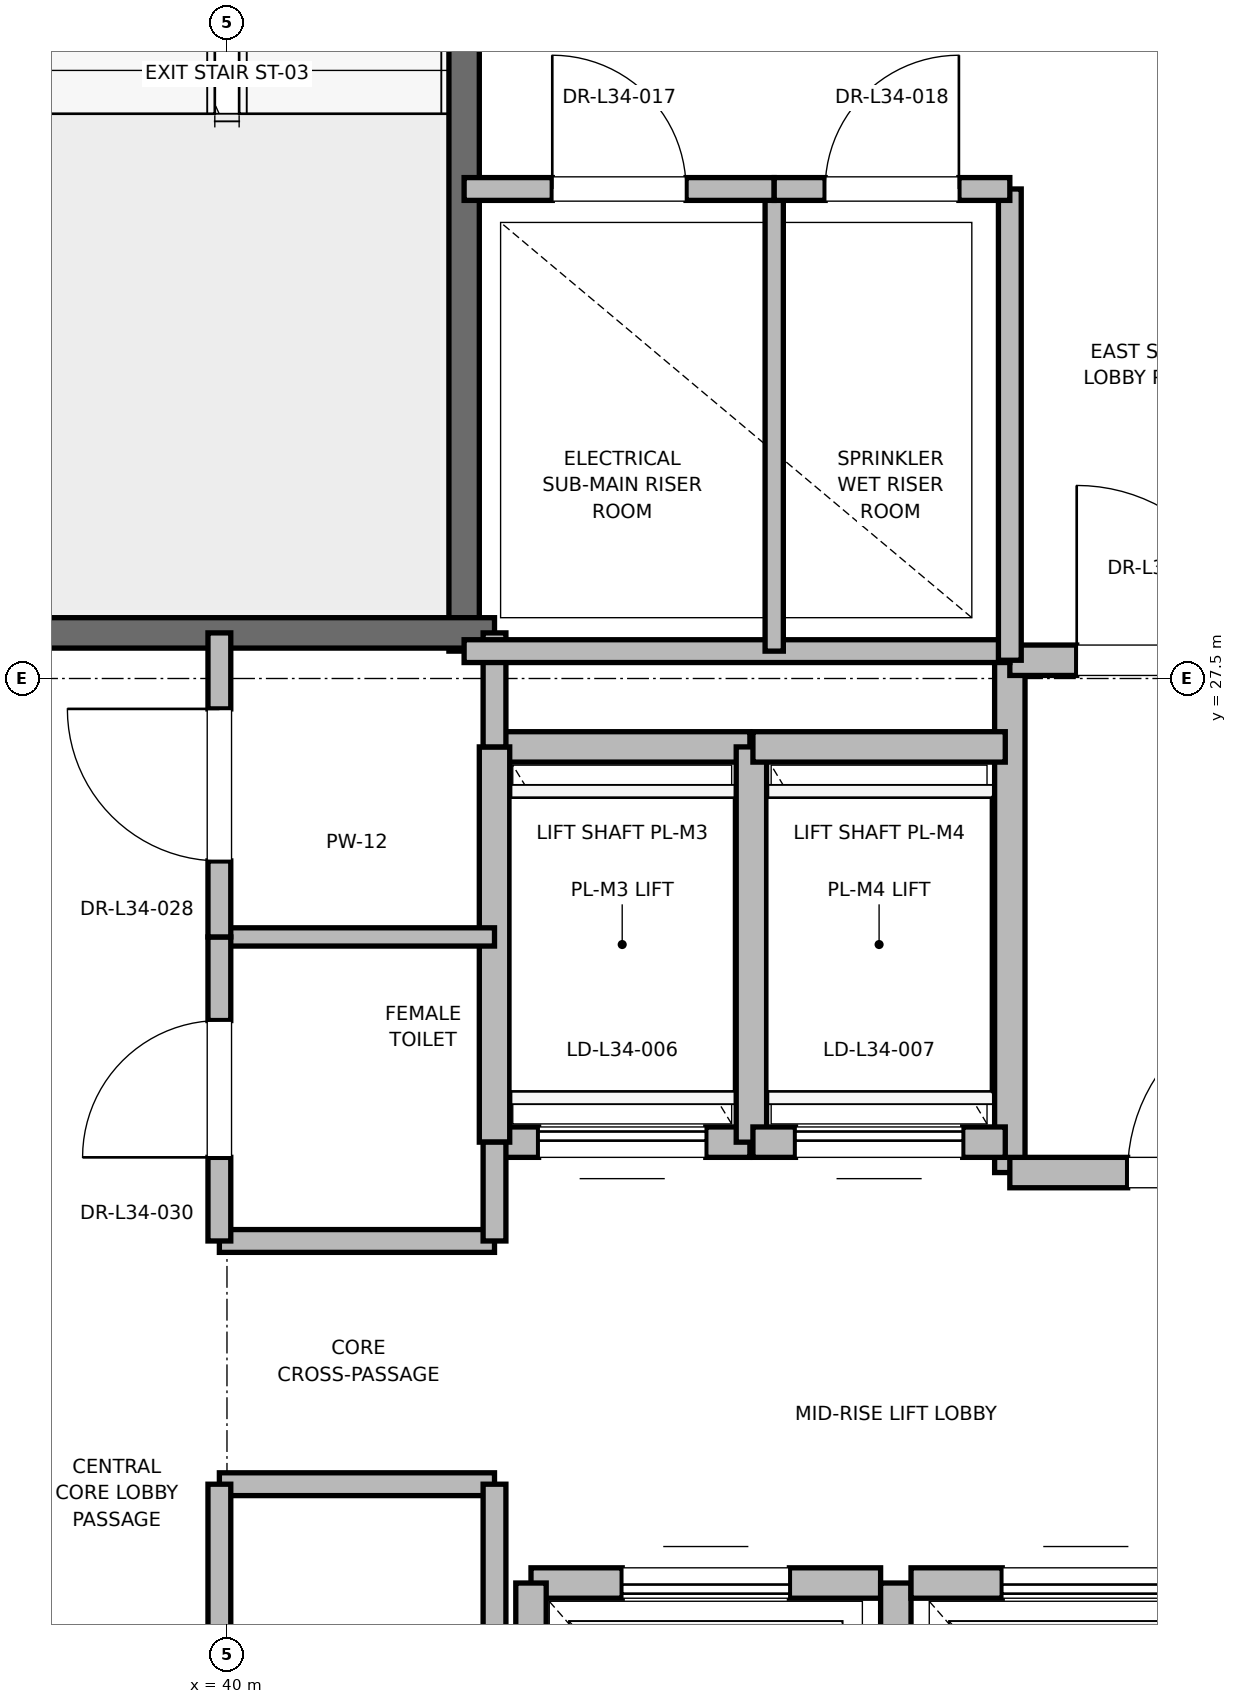
"""IFC4 building model, lengths in metres.
Left out: names, types, materials, properties, quantities, classifications, styles, units other than length and angle.
Written with IfcOpenShell. Run it as: python <this file> out.ifc"""

import sys

from ifc_helpers import new_model, si_unit, direction, frame, frame_2d, origin, place, context, subcontext, project, spatial, rectangle, extrude, element, fill, save


model = new_model("IFC4")
c1 = context("Model", 3, precision=1e-05, world=origin(), true_north=direction((0.0, 1.0)))
c2 = subcontext(c1, "Body", "Model", "MODEL_VIEW")
j1 = project(units=[si_unit("LENGTHUNIT", "METRE"), si_unit("PLANEANGLEUNIT", "RADIAN")], contexts=[c1])
p1 = place(None, origin())
s1 = spatial("IfcSite", under=j1, at=p1, CompositionType="ELEMENT")
p2 = place(p1, origin())
s2 = spatial("IfcBuilding", under=s1, at=p2, CompositionType="ELEMENT")
p3 = place(p2, frame((0.0, 0.0, 148.4)))
s3 = spatial("IfcBuildingStorey", under=s2, at=p3, CompositionType="ELEMENT", Elevation=148.4)
p4 = place(p3, frame((41.56, 27.68, 0.0), z_axis=(0.0, 0.0, 1.0), x_axis=(0.0, 1.0, 0.0)))
e1 = element("IfcWall", 1, at=p4, inside=s3, PredefinedType="SOLIDWALL", context=c2, shape_type="SweptSolid", body=[
    extrude(rectangle(XDim=8.57, YDim=0.2, at=frame_2d((4.285, 0.0))), origin(), (0.0, 0.0, 1.0), 3.775),
])
p5 = place(p3, frame((38.44, 27.8, 0.0), z_axis=(0.0, 0.0, 1.0), x_axis=(1.0, 0.0, 0.0)))
e2 = element("IfcWall", 2, at=p5, inside=s3, PredefinedType="SOLIDWALL", context=c2, shape_type="SweptSolid", body=[
    extrude(rectangle(XDim=3.32, YDim=0.2, at=frame_2d((1.66, 0.0))), origin(), (0.0, 0.0, 1.0), 3.775),
])
p6 = place(p3, frame((45.15, 24.25, 0.0), z_axis=(0.0, 0.0, 1.0), x_axis=(0.0, 1.0, 0.0)))
e3 = element("IfcWall", 3, at=p6, inside=s3, PredefinedType="PARTITIONING", context=c2, shape_type="SweptSolid", body=[
    extrude(rectangle(XDim=3.37, YDim=0.2, at=frame_2d((1.685, 0.0))), origin(), (0.0, 0.0, 1.0), 3.775),
])
p7 = place(p3, frame((45.15, 24.25, 0.0), z_axis=(0.0, 0.0, 1.0), x_axis=(1.0, 0.0, 0.0)))
e4 = element("IfcWall", 4, at=p7, inside=s3, PredefinedType="PARTITIONING", context=c2, shape_type="SweptSolid", body=[
    extrude(rectangle(XDim=2.7, YDim=0.2, at=frame_2d((1.35, 0.0))), origin(), (0.0, 0.0, 1.0), 3.775),
])
p8 = place(p7, frame((0.775, 0.0, 0.0)))
e5 = element("IfcOpeningElement", 5, at=p8, cuts=e4, PredefinedType="OPENING", context=c2, shape_type="SweptSolid", body=[
    extrude(rectangle(XDim=1.15, YDim=2.2, at=frame_2d((0.575, 1.1))), frame((0.0, 0.1, 0.0), z_axis=(0.0, -1.0, 0.0), x_axis=(1.0, 0.0, 0.0)), (0.0, 0.0, 1.0), 0.2),
])
p9 = place(p3, frame((45.15, 27.62, 0.0), z_axis=(0.0, 0.0, 1.0), x_axis=(1.0, 0.0, 0.0)))
e6 = element("IfcWall", 6, at=p9, inside=s3, PredefinedType="PARTITIONING", context=c2, shape_type="SweptSolid", body=[
    extrude(rectangle(XDim=2.03, YDim=0.2, at=frame_2d((1.015, 0.0))), origin(), (0.0, 0.0, 1.0), 3.775),
])
p10 = place(p9, frame((0.44, 0.0, 0.0)))
e7 = element("IfcOpeningElement", 7, at=p10, cuts=e6, PredefinedType="OPENING", context=c2, shape_type="SweptSolid", body=[
    extrude(rectangle(XDim=1.15, YDim=2.2, at=frame_2d((0.575, 1.1))), frame((0.0, 0.1, 0.0), z_axis=(0.0, -1.0, 0.0), x_axis=(1.0, 0.0, 0.0)), (0.0, 0.0, 1.0), 0.2),
])
p11 = place(p3, frame((44.3, 21.55, 0.0), z_axis=(0.0, 0.0, 1.0), x_axis=(-1.0, 0.0, 0.0)))
e8 = element("IfcWall", 8, at=p11, inside=s3, PredefinedType="SOLIDWALL", context=c2, shape_type="SweptSolid", body=[
    extrude(rectangle(XDim=2.3, YDim=0.2, at=frame_2d((1.15, 0.0))), origin(), (0.0, 0.0, 1.0), 3.775),
])
p12 = place(p11, frame((0.6, 0.0, 0.0)))
e9 = element("IfcOpeningElement", 9, at=p12, cuts=e8, PredefinedType="OPENING", context=c2, shape_type="SweptSolid", body=[
    extrude(rectangle(XDim=1.1, YDim=2.2, at=frame_2d((0.55, 1.1))), frame((0.0, 0.1, 0.0), z_axis=(0.0, -1.0, 0.0), x_axis=(1.0, 0.0, 0.0)), (0.0, 0.0, 1.0), 0.2),
])
p13 = place(p3, frame((42.0, 21.55, 0.0), z_axis=(0.0, 0.0, 1.0), x_axis=(0.0, -1.0, 0.0)))
e10 = element("IfcWall", 10, at=p13, inside=s3, PredefinedType="SOLIDWALL", context=c2, shape_type="SweptSolid", body=[
    extrude(rectangle(XDim=2.6, YDim=0.2, at=frame_2d((1.3, 0.0))), origin(), (0.0, 0.0, 1.0), 2.755),
])
p14 = place(p3, frame((44.4, 18.95, 0.0), z_axis=(0.0, 0.0, 1.0), x_axis=(0.0, 1.0, 0.0)))
e11 = element("IfcWall", 11, at=p14, inside=s3, PredefinedType="SOLIDWALL", context=c2, shape_type="SweptSolid", body=[
    extrude(rectangle(XDim=2.6, YDim=0.2, at=frame_2d((1.3, 0.0))), origin(), (0.0, 0.0, 1.0), 3.775),
])
p15 = place(p3, frame((46.8, 21.55, 0.0), z_axis=(0.0, 0.0, 1.0), x_axis=(-1.0, 0.0, 0.0)))
e12 = element("IfcWall", 12, at=p15, inside=s3, PredefinedType="SOLIDWALL", context=c2, shape_type="SweptSolid", body=[
    extrude(rectangle(XDim=2.3, YDim=0.2, at=frame_2d((1.15, 0.0))), origin(), (0.0, 0.0, 1.0), 3.775),
])
p16 = place(p15, frame((0.6, 0.0, 0.0)))
e13 = element("IfcOpeningElement", 13, at=p16, cuts=e12, PredefinedType="OPENING", context=c2, shape_type="SweptSolid", body=[
    extrude(rectangle(XDim=1.1, YDim=2.2, at=frame_2d((0.55, 1.1))), frame((0.0, 0.1, 0.0), z_axis=(0.0, -1.0, 0.0), x_axis=(1.0, 0.0, 0.0)), (0.0, 0.0, 1.0), 0.2),
])
p17 = place(p3, frame((41.76, 24.45, 0.0), z_axis=(0.0, 0.0, 1.0), x_axis=(1.0, 0.0, 0.0)))
e14 = element("IfcWall", 14, at=p17, inside=s3, PredefinedType="SOLIDWALL", context=c2, shape_type="SweptSolid", body=[
    extrude(rectangle(XDim=1.68, YDim=0.2, at=frame_2d((0.84, 0.0))), origin(), (0.0, 0.0, 1.0), 3.775),
])
p18 = place(p17, frame((0.29, 0.0, 0.0)))
e15 = element("IfcOpeningElement", 15, at=p18, cuts=e14, PredefinedType="OPENING", context=c2, shape_type="SweptSolid", body=[
    extrude(rectangle(XDim=1.1, YDim=2.2, at=frame_2d((0.55, 1.1))), frame((0.0, 0.1, 0.0), z_axis=(0.0, -1.0, 0.0), x_axis=(1.0, 0.0, 0.0)), (0.0, 0.0, 1.0), 0.2),
])
p19 = place(p3, frame((43.44, 27.05, 0.0), z_axis=(0.0, 0.0, 1.0), x_axis=(-1.0, 0.0, 0.0)))
e16 = element("IfcWall", 16, at=p19, inside=s3, PredefinedType="SOLIDWALL", context=c2, shape_type="SweptSolid", body=[
    extrude(rectangle(XDim=1.68, YDim=0.2, at=frame_2d((0.84, 0.0))), origin(), (0.0, 0.0, 1.0), 3.775),
])
for number, where, z_axis, x_axis in (
    (17, (41.76, 27.05, 0.0), (0.0, 0.0, 1.0), (0.0, -1.0, 0.0)),
    (18, (43.45, 24.45, 0.0), (0.0, 0.0, 1.0), (0.0, 1.0, 0.0)),
):
    element("IfcWall", number, at=place(p3, frame(where, z_axis=z_axis, x_axis=x_axis)), inside=s3, PredefinedType="SOLIDWALL", context=c2, shape_type="SweptSolid", body=[
        extrude(rectangle(XDim=2.6, YDim=0.2, at=frame_2d((1.3, 0.0))), origin(), (0.0, 0.0, 1.0), 3.775),
    ])
p20 = place(p3, frame((43.46, 24.45, 0.0), z_axis=(0.0, 0.0, 1.0), x_axis=(1.0, 0.0, 0.0)))
e19 = element("IfcWall", 19, at=p20, inside=s3, PredefinedType="SOLIDWALL", context=c2, shape_type="SweptSolid", body=[
    extrude(rectangle(XDim=1.66, YDim=0.2, at=frame_2d((0.83, 0.0))), origin(), (0.0, 0.0, 1.0), 3.775),
])
p21 = place(p20, frame((0.28, 0.0, 0.0)))
e20 = element("IfcOpeningElement", 20, at=p21, cuts=e19, PredefinedType="OPENING", context=c2, shape_type="SweptSolid", body=[
    extrude(rectangle(XDim=1.1, YDim=2.2, at=frame_2d((0.55, 1.1))), frame((0.0, 0.1, 0.0), z_axis=(0.0, -1.0, 0.0), x_axis=(1.0, 0.0, 0.0)), (0.0, 0.0, 1.0), 0.2),
])
p22 = place(p3, frame((45.12, 27.05, 0.0), z_axis=(0.0, 0.0, 1.0), x_axis=(-1.0, 0.0, 0.0)))
e21 = element("IfcWall", 21, at=p22, inside=s3, PredefinedType="SOLIDWALL", context=c2, shape_type="SweptSolid", body=[
    extrude(rectangle(XDim=1.66, YDim=0.2, at=frame_2d((0.83, 0.0))), origin(), (0.0, 0.0, 1.0), 3.775),
])
for number, where, z_axis, x_axis in (
    (22, (39.95, 22.2, 0.0), (0.0, 0.0, 1.0), (1.0, 0.0, 0.0)),
    (23, (39.95, 23.8, 0.0), (0.0, 0.0, 1.0), (1.0, 0.0, 0.0)),
):
    element("IfcWall", number, at=place(p3, frame(where, z_axis=z_axis, x_axis=x_axis)), inside=s3, PredefinedType="PARTITIONING", context=c2, shape_type="SweptSolid", body=[
        extrude(rectangle(XDim=1.81, YDim=0.15, at=frame_2d((0.905, 0.0))), origin(), (0.0, 0.0, 1.0), 2.85),
    ])
p23 = place(p3, frame((39.95, 25.8, 0.0), z_axis=(0.0, 0.0, 1.0), x_axis=(1.0, 0.0, 0.0)))
e24 = element("IfcWall", 24, at=p23, inside=s3, PredefinedType="PARTITIONING", context=c2, shape_type="SweptSolid", body=[
    extrude(rectangle(XDim=1.81, YDim=0.12, at=frame_2d((0.905, 0.0))), origin(), (0.0, 0.0, 1.0), 2.85),
])
p24 = place(p3, frame((41.76, 18.6, 0.0), z_axis=(0.0, 0.0, 1.0), x_axis=(0.0, 1.0, 0.0)))
e25 = element("IfcWall", 25, at=p24, inside=s3, PredefinedType="PARTITIONING", context=c2, shape_type="SweptSolid", body=[
    extrude(rectangle(XDim=3.6, YDim=0.15, at=frame_2d((1.8, 0.0))), origin(), (0.0, 0.0, 1.0), 2.755),
])
p25 = place(p3, frame((41.76, 23.8, 0.0), z_axis=(0.0, 0.0, 1.0), x_axis=(0.0, 1.0, 0.0)))
e26 = element("IfcWall", 26, at=p25, inside=s3, PredefinedType="PARTITIONING", context=c2, shape_type="SweptSolid", body=[
    extrude(rectangle(XDim=0.65, YDim=0.15, at=frame_2d((0.325, 0.0))), origin(), (0.0, 0.0, 1.0), 2.85),
])
p26 = place(p3, frame((41.76, 27.05, 0.0), z_axis=(0.0, 0.0, 1.0), x_axis=(0.0, 1.0, 0.0)))
e27 = element("IfcWall", 27, at=p26, inside=s3, PredefinedType="PARTITIONING", context=c2, shape_type="SweptSolid", body=[
    extrude(rectangle(XDim=0.75, YDim=0.15, at=frame_2d((0.375, 0.0))), origin(), (0.0, 0.0, 1.0), 2.85),
])
p27 = place(p3, frame((39.95, 19.2, 0.0), z_axis=(0.0, 0.0, 1.0), x_axis=(0.0, 1.0, 0.0)))
e28 = element("IfcWall", 28, at=p27, inside=s3, PredefinedType="PARTITIONING", context=c2, shape_type="SweptSolid", body=[
    extrude(rectangle(XDim=3.0, YDim=0.15, at=frame_2d((1.5, 0.0))), origin(), (0.0, 0.0, 1.0), 2.85),
])
p28 = place(p27, frame((1.05, 0.0, 0.0)))
e29 = element("IfcOpeningElement", 29, at=p28, cuts=e28, PredefinedType="OPENING", context=c2, shape_type="SweptSolid", body=[
    extrude(rectangle(XDim=0.9, YDim=2.1, at=frame_2d((0.45, 1.05))), frame((0.0, 0.075, 0.0), z_axis=(0.0, -1.0, 0.0), x_axis=(1.0, 0.0, 0.0)), (0.0, 0.0, 1.0), 0.15),
])
p29 = place(p3, frame((39.95, 23.8, 0.0), z_axis=(0.0, 0.0, 1.0), x_axis=(0.0, 1.0, 0.0)))
e30 = element("IfcWall", 30, at=p29, inside=s3, PredefinedType="PARTITIONING", context=c2, shape_type="SweptSolid", body=[
    extrude(rectangle(XDim=2.0, YDim=0.15, at=frame_2d((1.0, 0.0))), origin(), (0.0, 0.0, 1.0), 2.85),
])
p30 = place(p29, frame((0.55, 0.0, 0.0)))
e31 = element("IfcOpeningElement", 31, at=p30, cuts=e30, PredefinedType="OPENING", context=c2, shape_type="SweptSolid", body=[
    extrude(rectangle(XDim=0.9, YDim=2.1, at=frame_2d((0.45, 1.05))), frame((0.0, 0.075, 0.0), z_axis=(0.0, -1.0, 0.0), x_axis=(1.0, 0.0, 0.0)), (0.0, 0.0, 1.0), 0.15),
])
p31 = place(p3, frame((39.95, 25.8, 0.0), z_axis=(0.0, 0.0, 1.0), x_axis=(0.0, 1.0, 0.0)))
e32 = element("IfcWall", 32, at=p31, inside=s3, PredefinedType="PARTITIONING", context=c2, shape_type="SweptSolid", body=[
    extrude(rectangle(XDim=2.0, YDim=0.15, at=frame_2d((1.0, 0.0))), origin(), (0.0, 0.0, 1.0), 2.85),
])
p32 = place(p31, frame((0.5, 0.0, 0.0)))
e33 = element("IfcOpeningElement", 33, at=p32, cuts=e32, PredefinedType="OPENING", context=c2, shape_type="SweptSolid", body=[
    extrude(rectangle(XDim=1.0, YDim=2.15, at=frame_2d((0.5, 1.075))), frame((0.0, 0.075, 0.0), z_axis=(0.0, -1.0, 0.0), x_axis=(1.0, 0.0, 0.0)), (0.0, 0.0, 1.0), 0.15),
])
p33 = place(p3, frame((41.56, 27.68, 0.0), z_axis=(0.0, 0.0, 1.0), x_axis=(1.0, 0.0, 0.0)))
e34 = element("IfcWall", 34, at=p33, inside=s3, PredefinedType="PARTITIONING", context=c2, shape_type="SweptSolid", body=[
    extrude(rectangle(XDim=3.59, YDim=0.15, at=frame_2d((1.795, 0.0))), origin(), (0.0, 0.0, 1.0), 2.85),
])
p34 = place(p3, frame((45.15, 27.62, 0.0), z_axis=(0.0, 0.0, 1.0), x_axis=(0.0, 1.0, 0.0)))
e35 = element("IfcWall", 35, at=p34, inside=s3, PredefinedType="PARTITIONING", context=c2, shape_type="SweptSolid", body=[
    extrude(rectangle(XDim=3.1, YDim=0.15, at=frame_2d((1.55, 0.0))), origin(), (0.0, 0.0, 1.0), 2.85),
])
p35 = place(p3, frame((43.6, 27.68, 0.0), z_axis=(0.0, 0.0, 1.0), x_axis=(0.0, 1.0, 0.0)))
e36 = element("IfcWall", 36, at=p35, inside=s3, PredefinedType="PARTITIONING", context=c2, shape_type="SweptSolid", body=[
    extrude(rectangle(XDim=3.04, YDim=0.12, at=frame_2d((1.52, 0.0))), origin(), (0.0, 0.0, 1.0), 2.85),
])
p36 = place(p3, frame((41.56, 30.72, 0.0), z_axis=(0.0, 0.0, 1.0), x_axis=(1.0, 0.0, 0.0)))
e37 = element("IfcWall", 37, at=p36, inside=s3, PredefinedType="PARTITIONING", context=c2, shape_type="SweptSolid", body=[
    extrude(rectangle(XDim=2.04, YDim=0.15, at=frame_2d((1.02, 0.0))), origin(), (0.0, 0.0, 1.0), 2.85),
])
p37 = place(p36, frame((0.58, 0.0, 0.0)))
e38 = element("IfcOpeningElement", 38, at=p37, cuts=e37, PredefinedType="OPENING", context=c2, shape_type="SweptSolid", body=[
    extrude(rectangle(XDim=0.88, YDim=2.1, at=frame_2d((0.44, 1.05))), frame((0.0, 0.075, 0.0), z_axis=(0.0, -1.0, 0.0), x_axis=(1.0, 0.0, 0.0)), (0.0, 0.0, 1.0), 0.15),
])
p38 = place(p3, frame((43.6, 30.72, 0.0), z_axis=(0.0, 0.0, 1.0), x_axis=(1.0, 0.0, 0.0)))
e39 = element("IfcWall", 39, at=p38, inside=s3, PredefinedType="PARTITIONING", context=c2, shape_type="SweptSolid", body=[
    extrude(rectangle(XDim=1.55, YDim=0.15, at=frame_2d((0.775, 0.0))), origin(), (0.0, 0.0, 1.0), 2.85),
])
p39 = place(p38, frame((0.335, 0.0, 0.0)))
e40 = element("IfcOpeningElement", 40, at=p39, cuts=e39, PredefinedType="OPENING", context=c2, shape_type="SweptSolid", body=[
    extrude(rectangle(XDim=0.88, YDim=2.1, at=frame_2d((0.44, 1.05))), frame((0.0, 0.075, 0.0), z_axis=(0.0, -1.0, 0.0), x_axis=(1.0, 0.0, 0.0)), (0.0, 0.0, 1.0), 0.15),
])
p40 = place(p8, origin())
e41 = element("IfcDoor", 41, at=p40, inside=s3, OperationType="SINGLE_SWING_RIGHT", PredefinedType="DOOR", context=c2, shape_type="SweptSolid", body=[
    extrude(rectangle(XDim=1.15, YDim=2.2, at=frame_2d((0.575, 1.1))), frame((0.0, 0.025, 0.0), z_axis=(0.0, -1.0, 0.0), x_axis=(1.0, 0.0, 0.0)), (0.0, 0.0, 1.0), 0.05),
])
fill(e5, e41)
p41 = place(p10, origin())
e42 = element("IfcDoor", 42, at=p41, inside=s3, OperationType="SINGLE_SWING_LEFT", PredefinedType="DOOR", context=c2, shape_type="SweptSolid", body=[
    extrude(rectangle(XDim=1.15, YDim=2.2, at=frame_2d((0.575, 1.1))), frame((0.0, 0.025, 0.0), z_axis=(0.0, -1.0, 0.0), x_axis=(1.0, 0.0, 0.0)), (0.0, 0.0, 1.0), 0.05),
])
fill(e7, e42)
p42 = place(p12, origin())
e43 = element("IfcDoor", 43, at=p42, inside=s3, OperationType="SLIDING_TO_RIGHT", PredefinedType="DOOR", context=c2, shape_type="SweptSolid", body=[
    extrude(rectangle(XDim=1.1, YDim=2.2, at=frame_2d((0.55, 1.1))), frame((0.0, 0.025, 0.0), z_axis=(0.0, -1.0, 0.0), x_axis=(1.0, 0.0, 0.0)), (0.0, 0.0, 1.0), 0.05),
])
fill(e9, e43)
p43 = place(p16, origin())
e44 = element("IfcDoor", 44, at=p43, inside=s3, OperationType="SLIDING_TO_RIGHT", PredefinedType="DOOR", context=c2, shape_type="SweptSolid", body=[
    extrude(rectangle(XDim=1.1, YDim=2.2, at=frame_2d((0.55, 1.1))), frame((0.0, 0.025, 0.0), z_axis=(0.0, -1.0, 0.0), x_axis=(1.0, 0.0, 0.0)), (0.0, 0.0, 1.0), 0.05),
])
fill(e13, e44)
p44 = place(p18, origin())
e45 = element("IfcDoor", 45, at=p44, inside=s3, OperationType="SLIDING_TO_RIGHT", PredefinedType="DOOR", context=c2, shape_type="SweptSolid", body=[
    extrude(rectangle(XDim=1.1, YDim=2.2, at=frame_2d((0.55, 1.1))), frame((0.0, 0.025, 0.0), z_axis=(0.0, -1.0, 0.0), x_axis=(1.0, 0.0, 0.0)), (0.0, 0.0, 1.0), 0.05),
])
fill(e15, e45)
p45 = place(p21, origin())
e46 = element("IfcDoor", 46, at=p45, inside=s3, OperationType="SLIDING_TO_RIGHT", PredefinedType="DOOR", context=c2, shape_type="SweptSolid", body=[
    extrude(rectangle(XDim=1.1, YDim=2.2, at=frame_2d((0.55, 1.1))), frame((0.0, 0.025, 0.0), z_axis=(0.0, -1.0, 0.0), x_axis=(1.0, 0.0, 0.0)), (0.0, 0.0, 1.0), 0.05),
])
fill(e20, e46)
p46 = place(p30, origin())
e47 = element("IfcDoor", 47, at=p46, inside=s3, OperationType="SINGLE_SWING_LEFT", PredefinedType="DOOR", context=c2, shape_type="SweptSolid", body=[
    extrude(rectangle(XDim=0.9, YDim=2.1, at=frame_2d((0.45, 1.05))), frame((0.0, 0.025, 0.0), z_axis=(0.0, -1.0, 0.0), x_axis=(1.0, 0.0, 0.0)), (0.0, 0.0, 1.0), 0.05),
])
fill(e31, e47)
p47 = place(p32, origin())
e48 = element("IfcDoor", 48, at=p47, inside=s3, OperationType="SINGLE_SWING_RIGHT", PredefinedType="DOOR", context=c2, shape_type="SweptSolid", body=[
    extrude(rectangle(XDim=1.0, YDim=2.15, at=frame_2d((0.5, 1.075))), frame((0.0, 0.025, 0.0), z_axis=(0.0, -1.0, 0.0), x_axis=(1.0, 0.0, 0.0)), (0.0, 0.0, 1.0), 0.05),
])
fill(e33, e48)
p48 = place(p37, origin())
e49 = element("IfcDoor", 49, at=p48, inside=s3, OperationType="SINGLE_SWING_LEFT", PredefinedType="DOOR", context=c2, shape_type="SweptSolid", body=[
    extrude(rectangle(XDim=0.88, YDim=2.1, at=frame_2d((0.44, 1.05))), frame((0.0, 0.025, 0.0), z_axis=(0.0, -1.0, 0.0), x_axis=(1.0, 0.0, 0.0)), (0.0, 0.0, 1.0), 0.05),
])
fill(e38, e49)
p49 = place(p39, origin())
e50 = element("IfcDoor", 50, at=p49, inside=s3, OperationType="SINGLE_SWING_RIGHT", PredefinedType="DOOR", context=c2, shape_type="SweptSolid", body=[
    extrude(rectangle(XDim=0.88, YDim=2.1, at=frame_2d((0.44, 1.05))), frame((0.0, 0.025, 0.0), z_axis=(0.0, -1.0, 0.0), x_axis=(1.0, 0.0, 0.0)), (0.0, 0.0, 1.0), 0.05),
])
fill(e40, e50)
save(model, sys.argv[1])
